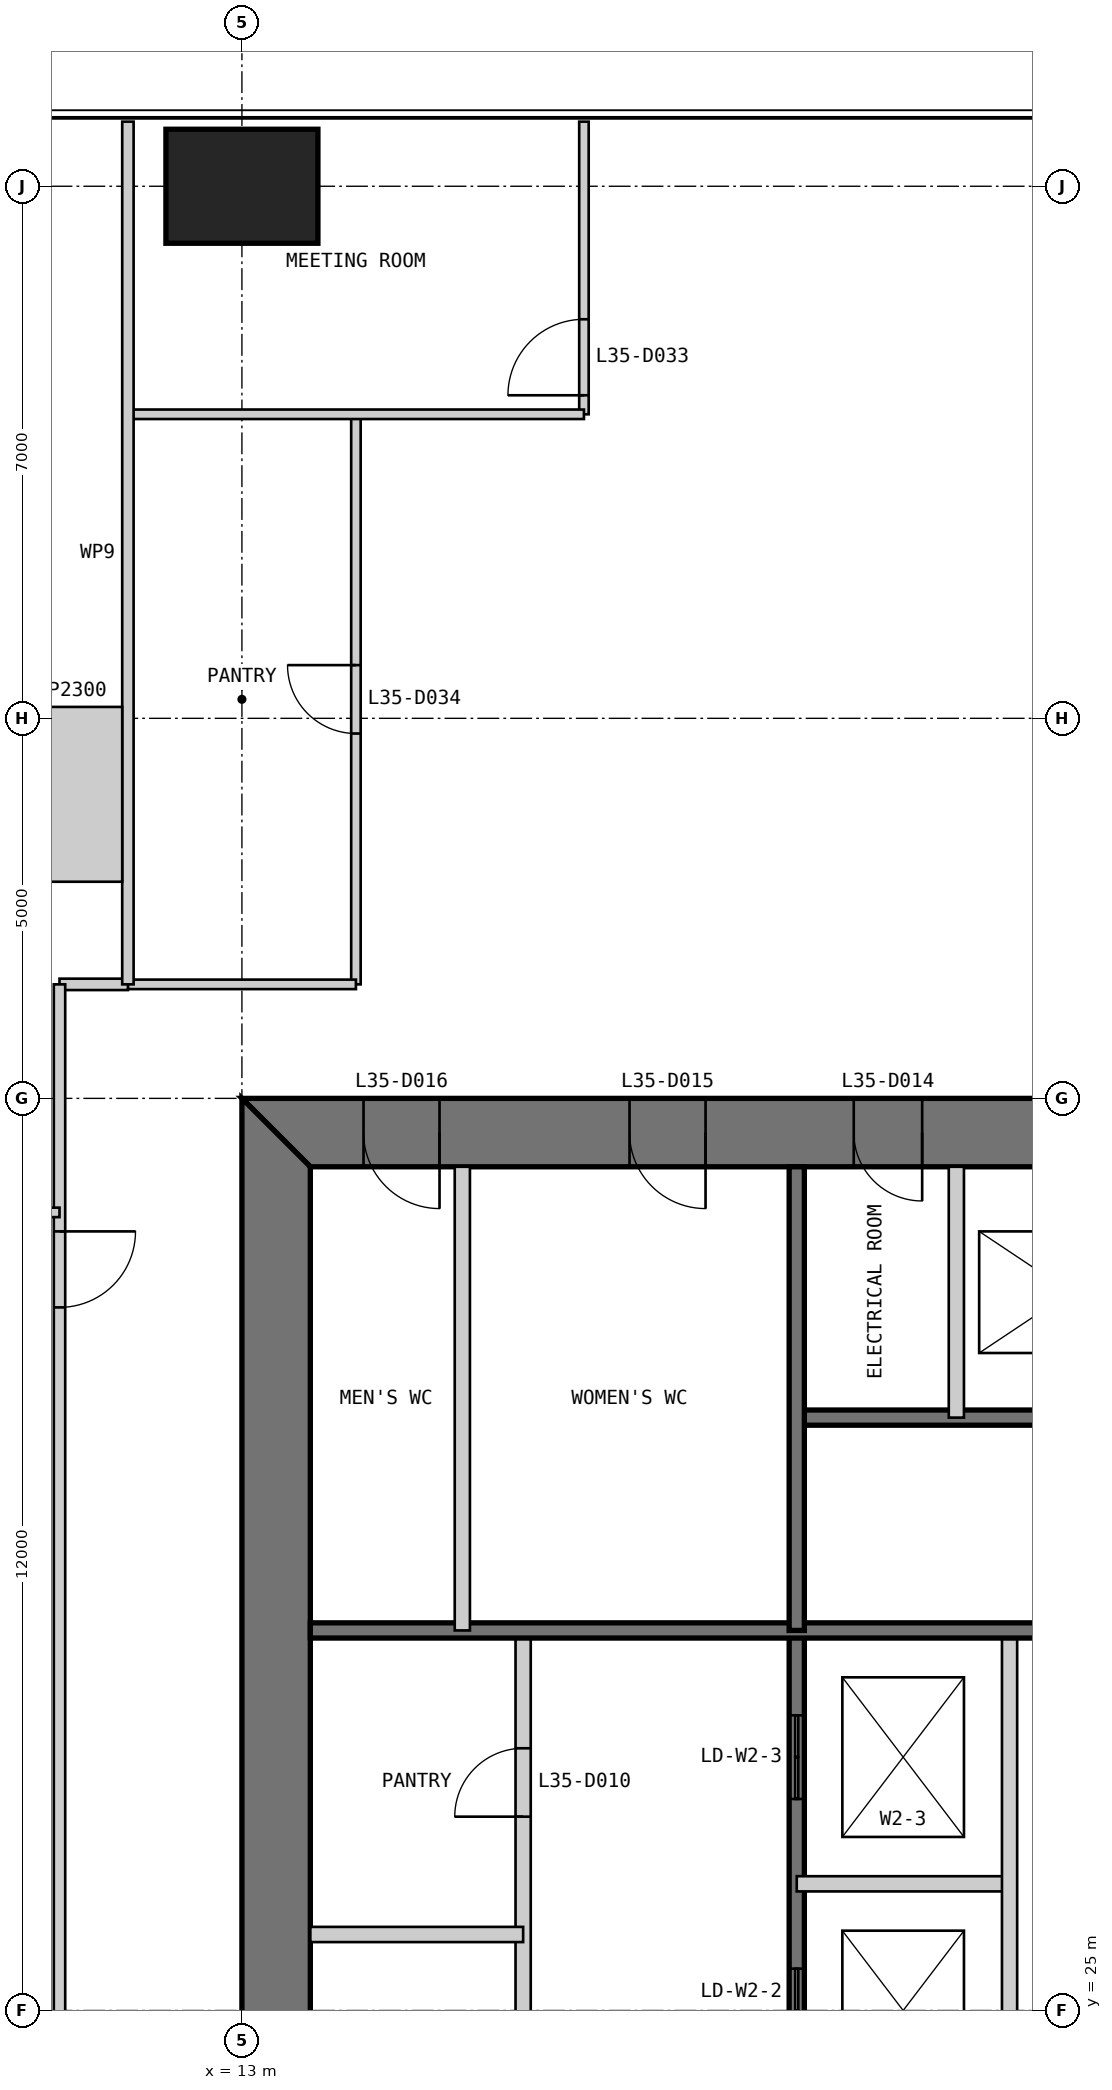
"""IFC4 building model, lengths in metres.
Left out: names, types, materials, properties, quantities, classifications, styles, units other than length and angle.
Written with IfcOpenShell. Run it as: python <this file> out.ifc"""

import sys

from ifc_helpers import new_model, si_unit, direction, frame, frame_2d, origin, origin_2d, place, context, subcontext, project, spatial, polyline, rectangle, outline, extrude, element, fill, save


model = new_model("IFC4")
c1 = context("Model", 3, precision=1e-05, world=origin(), true_north=direction((0.0, 1.0)))
c2 = subcontext(c1, "Body", "Model", "MODEL_VIEW")
j1 = project(units=[si_unit("LENGTHUNIT", "METRE"), si_unit("PLANEANGLEUNIT", "RADIAN")], contexts=[c1])
p1 = place(None, origin())
s1 = spatial("IfcSite", under=j1, at=p1, CompositionType="ELEMENT")
p2 = place(p1, origin())
s2 = spatial("IfcBuilding", under=s1, at=p2, CompositionType="ELEMENT")
p3 = place(p2, frame((0.0, 0.0, 150.4)))
s3 = spatial("IfcBuildingStorey", under=s2, at=p3, CompositionType="ELEMENT", Elevation=150.4)
p4 = place(p3, frame((13.0, 49.0, 0.0), z_axis=(0.0, 0.0, 1.0), x_axis=(1.0, 0.0, 0.0)))
e1 = element("IfcColumn", 1, at=p4, inside=s3, PredefinedType="COLUMN", context=c2, shape_type="SweptSolid", body=[
    extrude(rectangle(XDim=2.0, YDim=1.5, at=origin_2d()), origin(), (0.0, 0.0, 1.0), 4.0),
])
p5 = place(p3, frame((37.0, 36.55, 0.0), z_axis=(0.0, 0.0, 1.0), x_axis=(-1.0, 0.0, 0.0)))
e2 = element("IfcWall", 2, at=p5, inside=s3, PredefinedType="SHEAR", context=c2, shape_type="SweptSolid", body=[
    extrude(outline(polyline([(0.0, -0.45), (24.0, -0.45), (23.1, 0.45), (0.9, 0.45), (0.0, -0.45)])), origin(), (0.0, 0.0, 1.0), 4.0),
])
p6 = place(p5, frame((4.9, 0.0, 0.0)))
e3 = element("IfcOpeningElement", 3, at=p6, cuts=e2, PredefinedType="OPENING", context=c2, shape_type="SweptSolid", body=[
    extrude(rectangle(XDim=1.0, YDim=2.2, at=frame_2d((0.5, 1.1))), frame((0.0, 0.46, 0.0), z_axis=(0.0, -1.0, 0.0), x_axis=(1.0, 0.0, 0.0)), (0.0, 0.0, 1.0), 0.92),
])
p7 = place(p5, frame((8.9, 0.0, 0.0)))
e4 = element("IfcOpeningElement", 4, at=p7, cuts=e2, PredefinedType="OPENING", context=c2, shape_type="SweptSolid", body=[
    extrude(rectangle(XDim=1.1, YDim=2.2, at=frame_2d((0.55, 1.1))), frame((0.0, 0.46, 0.0), z_axis=(0.0, -1.0, 0.0), x_axis=(1.0, 0.0, 0.0)), (0.0, 0.0, 1.0), 0.92),
])
p8 = place(p5, frame((15.05, 0.0, 0.0)))
e5 = element("IfcOpeningElement", 5, at=p8, cuts=e2, PredefinedType="OPENING", context=c2, shape_type="SweptSolid", body=[
    extrude(rectangle(XDim=0.9, YDim=2.2, at=frame_2d((0.45, 1.1))), frame((0.0, 0.46, 0.0), z_axis=(0.0, -1.0, 0.0), x_axis=(1.0, 0.0, 0.0)), (0.0, 0.0, 1.0), 0.92),
])
p9 = place(p5, frame((17.9, 0.0, 0.0)))
e6 = element("IfcOpeningElement", 6, at=p9, cuts=e2, PredefinedType="OPENING", context=c2, shape_type="SweptSolid", body=[
    extrude(rectangle(XDim=1.0, YDim=2.2, at=frame_2d((0.5, 1.1))), frame((0.0, 0.46, 0.0), z_axis=(0.0, -1.0, 0.0), x_axis=(1.0, 0.0, 0.0)), (0.0, 0.0, 1.0), 0.92),
])
p10 = place(p5, frame((21.4, 0.0, 0.0)))
e7 = element("IfcOpeningElement", 7, at=p10, cuts=e2, PredefinedType="OPENING", context=c2, shape_type="SweptSolid", body=[
    extrude(rectangle(XDim=1.0, YDim=2.2, at=frame_2d((0.5, 1.1))), frame((0.0, 0.46, 0.0), z_axis=(0.0, -1.0, 0.0), x_axis=(1.0, 0.0, 0.0)), (0.0, 0.0, 1.0), 0.92),
])
p11 = place(p3, frame((13.45, 36.1, 0.0), z_axis=(0.0, 0.0, 1.0), x_axis=(0.0, -1.0, 0.0)))
e8 = element("IfcWall", 8, at=p11, inside=s3, PredefinedType="SHEAR", context=c2, shape_type="SweptSolid", body=[
    extrude(outline(polyline([(-0.9, -0.45), (23.1, -0.45), (22.2, 0.45), (0.0, 0.45), (-0.9, -0.45)])), origin(), (0.0, 0.0, 1.0), 4.0),
])
p12 = place(p11, frame((20.2, 0.0, 0.0)))
e9 = element("IfcOpeningElement", 9, at=p12, cuts=e8, PredefinedType="OPENING", context=c2, shape_type="SweptSolid", body=[
    extrude(rectangle(XDim=1.0, YDim=2.2, at=frame_2d((0.5, 1.1))), frame((0.0, 0.46, 0.0), z_axis=(0.0, -1.0, 0.0), x_axis=(1.0, 0.0, 0.0)), (0.0, 0.0, 1.0), 0.92),
])
p13 = place(p11, frame((17.25, 0.0, 0.0)))
e10 = element("IfcOpeningElement", 10, at=p13, cuts=e8, PredefinedType="OPENING", context=c2, shape_type="SweptSolid", body=[
    extrude(rectangle(XDim=0.9, YDim=2.2, at=frame_2d((0.45, 1.1))), frame((0.0, 0.46, 0.0), z_axis=(0.0, -1.0, 0.0), x_axis=(1.0, 0.0, 0.0)), (0.0, 0.0, 1.0), 0.92),
])
p14 = place(p3, frame((16.7, 13.9, 0.0), z_axis=(0.0, 0.0, 1.0), x_axis=(0.0, 1.0, 0.0)))
e11 = element("IfcWall", 11, at=p14, inside=s3, PredefinedType="PARTITIONING", context=c2, shape_type="SweptSolid", body=[
    extrude(rectangle(XDim=16.1, YDim=0.2, at=frame_2d((8.05, 0.0))), origin(), (0.0, 0.0, 1.0), 3.8),
])
p15 = place(p14, frame((9.65, 0.0, 0.0)))
e12 = element("IfcOpeningElement", 12, at=p15, cuts=e11, PredefinedType="OPENING", context=c2, shape_type="SweptSolid", body=[
    extrude(rectangle(XDim=0.9, YDim=2.2, at=frame_2d((0.45, 1.1))), frame((0.0, 0.11, 0.0), z_axis=(0.0, -1.0, 0.0), x_axis=(1.0, 0.0, 0.0)), (0.0, 0.0, 1.0), 0.22),
])
p16 = place(p14, frame((13.65, 0.0, 0.0)))
e13 = element("IfcOpeningElement", 13, at=p16, cuts=e11, PredefinedType="OPENING", context=c2, shape_type="SweptSolid", body=[
    extrude(rectangle(XDim=0.9, YDim=2.2, at=frame_2d((0.45, 1.1))), frame((0.0, 0.11, 0.0), z_axis=(0.0, -1.0, 0.0), x_axis=(1.0, 0.0, 0.0)), (0.0, 0.0, 1.0), 0.22),
])
p17 = place(p3, frame((20.3, 13.9, 0.0), z_axis=(0.0, 0.0, 1.0), x_axis=(0.0, 1.0, 0.0)))
e14 = element("IfcWall", 14, at=p17, inside=s3, PredefinedType="SOLIDWALL", context=c2, shape_type="SweptSolid", body=[
    extrude(rectangle(XDim=16.1, YDim=0.2, at=frame_2d((8.05, 0.0))), origin(), (0.0, 0.0, 1.0), 3.8),
])
p18 = place(p17, frame((7.217, 0.0, 0.0)))
e15 = element("IfcOpeningElement", 15, at=p18, cuts=e14, PredefinedType="OPENING", context=c2, shape_type="SweptSolid", body=[
    extrude(rectangle(XDim=1.1, YDim=2.2, at=frame_2d((0.55, 1.1))), frame((0.0, 0.11, 0.0), z_axis=(0.0, -1.0, 0.0), x_axis=(1.0, 0.0, 0.0)), (0.0, 0.0, 1.0), 0.22),
])
p19 = place(p17, frame((10.55, 0.0, 0.0)))
e16 = element("IfcOpeningElement", 16, at=p19, cuts=e14, PredefinedType="OPENING", context=c2, shape_type="SweptSolid", body=[
    extrude(rectangle(XDim=1.1, YDim=2.2, at=frame_2d((0.55, 1.1))), frame((0.0, 0.11, 0.0), z_axis=(0.0, -1.0, 0.0), x_axis=(1.0, 0.0, 0.0)), (0.0, 0.0, 1.0), 0.22),
])
p20 = place(p17, frame((13.883, 0.0, 0.0)))
e17 = element("IfcOpeningElement", 17, at=p20, cuts=e14, PredefinedType="OPENING", context=c2, shape_type="SweptSolid", body=[
    extrude(rectangle(XDim=1.1, YDim=2.2, at=frame_2d((0.55, 1.1))), frame((0.0, 0.11, 0.0), z_axis=(0.0, -1.0, 0.0), x_axis=(1.0, 0.0, 0.0)), (0.0, 0.0, 1.0), 0.22),
])
p21 = place(p3, frame((20.3, 26.667, 0.0), z_axis=(0.0, 0.0, 1.0), x_axis=(1.0, 0.0, 0.0)))
e18 = element("IfcWall", 18, at=p21, inside=s3, PredefinedType="PARTITIONING", context=c2, shape_type="SweptSolid", body=[
    extrude(rectangle(XDim=2.8, YDim=0.2, at=frame_2d((1.4, 0.0))), origin(), (0.0, 0.0, 1.0), 3.8),
])
p22 = place(p3, frame((23.1, 20.0, 0.0), z_axis=(0.0, 0.0, 1.0), x_axis=(0.0, 1.0, 0.0)))
e19 = element("IfcWall", 19, at=p22, inside=s3, PredefinedType="PARTITIONING", context=c2, shape_type="SweptSolid", body=[
    extrude(rectangle(XDim=10.0, YDim=0.2, at=frame_2d((5.0, 0.0))), origin(), (0.0, 0.0, 1.0), 3.8),
])
p23 = place(p3, frame((13.9, 26.0, 0.0), z_axis=(0.0, 0.0, 1.0), x_axis=(1.0, 0.0, 0.0)))
e20 = element("IfcWall", 20, at=p23, inside=s3, PredefinedType="PARTITIONING", context=c2, shape_type="SweptSolid", body=[
    extrude(rectangle(XDim=2.8, YDim=0.2, at=frame_2d((1.4, 0.0))), origin(), (0.0, 0.0, 1.0), 3.8),
])
p24 = place(p3, frame((29.7, 32.8, 0.0), z_axis=(0.0, 0.0, 1.0), x_axis=(-1.0, 0.0, 0.0)))
e21 = element("IfcWall", 21, at=p24, inside=s3, PredefinedType="SOLIDWALL", context=c2, shape_type="SweptSolid", body=[
    extrude(rectangle(XDim=9.4, YDim=0.2, at=frame_2d((4.7, 0.0))), origin(), (0.0, 0.0, 1.0), 3.8),
])
p25 = place(p24, frame((0.25, 0.0, 0.0)))
e22 = element("IfcOpeningElement", 22, at=p25, cuts=e21, PredefinedType="OPENING", context=c2, shape_type="SweptSolid", body=[
    extrude(rectangle(XDim=1.0, YDim=2.2, at=frame_2d((0.5, 1.1))), frame((0.0, 0.11, 0.0), z_axis=(0.0, -1.0, 0.0), x_axis=(1.0, 0.0, 0.0)), (0.0, 0.0, 1.0), 0.22),
])
p26 = place(p3, frame((29.7, 30.0, 0.0), z_axis=(0.0, 0.0, 1.0), x_axis=(-1.0, 0.0, 0.0)))
e23 = element("IfcWall", 23, at=p26, inside=s3, PredefinedType="SOLIDWALL", context=c2, shape_type="SweptSolid", body=[
    extrude(rectangle(XDim=15.8, YDim=0.2, at=frame_2d((7.9, 0.0))), origin(), (0.0, 0.0, 1.0), 3.8),
])
p27 = place(p3, frame((22.4, 36.1, 0.0), z_axis=(0.0, 0.0, 1.0), x_axis=(0.0, -1.0, 0.0)))
e24 = element("IfcWall", 24, at=p27, inside=s3, PredefinedType="PARTITIONING", context=c2, shape_type="SweptSolid", body=[
    extrude(rectangle(XDim=3.3, YDim=0.2, at=frame_2d((1.65, 0.0))), origin(), (0.0, 0.0, 1.0), 3.8),
])
p28 = place(p3, frame((20.3, 36.1, 0.0), z_axis=(0.0, 0.0, 1.0), x_axis=(0.0, -1.0, 0.0)))
e25 = element("IfcWall", 25, at=p28, inside=s3, PredefinedType="SOLIDWALL", context=c2, shape_type="SweptSolid", body=[
    extrude(rectangle(XDim=6.1, YDim=0.2, at=frame_2d((3.05, 0.0))), origin(), (0.0, 0.0, 1.0), 3.8),
])
p29 = place(p3, frame((15.9, 36.1, 0.0), z_axis=(0.0, 0.0, 1.0), x_axis=(0.0, -1.0, 0.0)))
e26 = element("IfcWall", 26, at=p29, inside=s3, PredefinedType="PARTITIONING", context=c2, shape_type="SweptSolid", body=[
    extrude(rectangle(XDim=6.1, YDim=0.2, at=frame_2d((3.05, 0.0))), origin(), (0.0, 0.0, 1.0), 3.8),
])
p30 = place(p3, frame((17.5, 49.85, 0.0), z_axis=(0.0, 0.0, 1.0), x_axis=(0.0, -1.0, 0.0)))
e27 = element("IfcWall", 27, at=p30, inside=s3, PredefinedType="PARTITIONING", context=c2, shape_type="SweptSolid", body=[
    extrude(rectangle(XDim=3.85, YDim=0.125, at=frame_2d((1.925, 0.0))), origin(), (0.0, 0.0, 1.0), 3.85),
])
p31 = place(p30, frame((2.6, 0.0, 0.0)))
e28 = element("IfcOpeningElement", 28, at=p31, cuts=e27, PredefinedType="OPENING", context=c2, shape_type="SweptSolid", body=[
    extrude(rectangle(XDim=1.0, YDim=2.2, at=frame_2d((0.5, 1.1))), frame((0.0, 0.073, 0.0), z_axis=(0.0, -1.0, 0.0), x_axis=(1.0, 0.0, 0.0)), (0.0, 0.0, 1.0), 0.145),
])
p32 = place(p3, frame((14.5, 46.0, 0.0), z_axis=(0.0, 0.0, 1.0), x_axis=(0.0, -1.0, 0.0)))
e29 = element("IfcWall", 29, at=p32, inside=s3, PredefinedType="PARTITIONING", context=c2, shape_type="SweptSolid", body=[
    extrude(rectangle(XDim=7.5, YDim=0.125, at=frame_2d((3.75, 0.0))), origin(), (0.0, 0.0, 1.0), 3.85),
])
p33 = place(p32, frame((3.3, 0.0, 0.0)))
e30 = element("IfcOpeningElement", 30, at=p33, cuts=e29, PredefinedType="OPENING", context=c2, shape_type="SweptSolid", body=[
    extrude(rectangle(XDim=0.9, YDim=2.2, at=frame_2d((0.45, 1.1))), frame((0.0, 0.073, 0.0), z_axis=(0.0, -1.0, 0.0), x_axis=(1.0, 0.0, 0.0)), (0.0, 0.0, 1.0), 0.145),
])
p34 = place(p3, frame((17.5, 46.0, 0.0), z_axis=(0.0, 0.0, 1.0), x_axis=(-1.0, 0.0, 0.0)))
e31 = element("IfcWall", 31, at=p34, inside=s3, PredefinedType="PARTITIONING", context=c2, shape_type="SweptSolid", body=[
    extrude(rectangle(XDim=6.0, YDim=0.125, at=frame_2d((3.0, 0.0))), origin(), (0.0, 0.0, 1.0), 3.85),
])
p35 = place(p3, frame((14.5, 38.5, 0.0), z_axis=(0.0, 0.0, 1.0), x_axis=(-1.0, 0.0, 0.0)))
e32 = element("IfcWall", 32, at=p35, inside=s3, PredefinedType="PARTITIONING", context=c2, shape_type="SweptSolid", body=[
    extrude(rectangle(XDim=3.0, YDim=0.125, at=frame_2d((1.5, 0.0))), origin(), (0.0, 0.0, 1.0), 3.85),
])
p36 = place(p3, frame((11.5, 38.5, 0.0), z_axis=(0.0, 0.0, 1.0), x_axis=(-1.0, 0.0, 0.0)))
e33 = element("IfcWall", 33, at=p36, inside=s3, PredefinedType="PARTITIONING", context=c2, shape_type="SweptSolid", body=[
    extrude(rectangle(XDim=0.9, YDim=0.15, at=frame_2d((0.45, 0.0))), origin(), (0.0, 0.0, 1.0), 3.85),
])
p37 = place(p3, frame((10.6, 38.5, 0.0), z_axis=(0.0, 0.0, 1.0), x_axis=(0.0, -1.0, 0.0)))
e34 = element("IfcWall", 34, at=p37, inside=s3, PredefinedType="PARTITIONING", context=c2, shape_type="SweptSolid", body=[
    extrude(rectangle(XDim=27.9, YDim=0.15, at=frame_2d((13.95, 0.0))), origin(), (0.0, 0.0, 1.0), 3.85),
])
p38 = place(p37, frame((3.25, 0.0, 0.0)))
e35 = element("IfcOpeningElement", 35, at=p38, cuts=e34, PredefinedType="OPENING", context=c2, shape_type="SweptSolid", body=[
    extrude(rectangle(XDim=1.0, YDim=2.2, at=frame_2d((0.5, 1.1))), frame((0.0, 0.085, 0.0), z_axis=(0.0, -1.0, 0.0), x_axis=(1.0, 0.0, 0.0)), (0.0, 0.0, 1.0), 0.17),
])
p39 = place(p37, frame((25.75, 0.0, 0.0)))
e36 = element("IfcOpeningElement", 36, at=p39, cuts=e34, PredefinedType="OPENING", context=c2, shape_type="SweptSolid", body=[
    extrude(rectangle(XDim=1.0, YDim=2.2, at=frame_2d((0.5, 1.1))), frame((0.0, 0.085, 0.0), z_axis=(0.0, -1.0, 0.0), x_axis=(1.0, 0.0, 0.0)), (0.0, 0.0, 1.0), 0.17),
])
p40 = place(p3, frame((11.5, 49.85, 0.0), z_axis=(0.0, 0.0, 1.0), x_axis=(0.0, -1.0, 0.0)))
e37 = element("IfcWall", 37, at=p40, inside=s3, PredefinedType="PARTITIONING", context=c2, shape_type="SweptSolid", body=[
    extrude(rectangle(XDim=11.35, YDim=0.15, at=frame_2d((5.675, 0.0))), origin(), (0.0, 0.0, 1.0), 3.85),
])
p41 = place(p3, frame((0.15, 35.5, 0.0), z_axis=(0.0, 0.0, 1.0), x_axis=(1.0, 0.0, 0.0)))
e38 = element("IfcWall", 38, at=p41, inside=s3, PredefinedType="PARTITIONING", context=c2, shape_type="SweptSolid", body=[
    extrude(rectangle(XDim=10.45, YDim=0.125, at=frame_2d((5.225, 0.0))), origin(), (0.0, 0.0, 1.0), 3.85),
])
p42 = place(p41, frame((6.65, 0.0, 0.0)))
e39 = element("IfcOpeningElement", 39, at=p42, cuts=e38, PredefinedType="OPENING", context=c2, shape_type="SweptSolid", body=[
    extrude(rectangle(XDim=1.0, YDim=2.2, at=frame_2d((0.5, 1.1))), frame((0.0, 0.073, 0.0), z_axis=(0.0, -1.0, 0.0), x_axis=(1.0, 0.0, 0.0)), (0.0, 0.0, 1.0), 0.145),
])
p43 = place(p3, frame((11.425, 41.0, 0.0), z_axis=(0.0, 0.0, 1.0), x_axis=(-1.0, 0.0, 0.0)))
e40 = element("IfcWall", 40, at=p43, inside=s3, PredefinedType="PARTITIONING", context=c2, shape_type="SweptSolid", body=[
    extrude(rectangle(XDim=1.325, YDim=2.3, at=frame_2d((0.663, 0.0))), origin(), (0.0, 0.0, 1.0), 3.85),
])
p44 = place(p16, origin())
e41 = element("IfcDoor", 41, at=p44, inside=s3, OperationType="SINGLE_SWING_LEFT", PredefinedType="DOOR", context=c2, shape_type="SweptSolid", body=[
    extrude(rectangle(XDim=0.9, YDim=2.2, at=frame_2d((0.45, 1.1))), frame((0.0, 0.025, 0.0), z_axis=(0.0, -1.0, 0.0), x_axis=(1.0, 0.0, 0.0)), (0.0, 0.0, 1.0), 0.05),
])
fill(e13, e41)
p45 = place(p8, origin())
e42 = element("IfcDoor", 42, at=p45, inside=s3, OperationType="SINGLE_SWING_LEFT", PredefinedType="DOOR", context=c2, shape_type="SweptSolid", body=[
    extrude(rectangle(XDim=0.9, YDim=2.2, at=frame_2d((0.45, 1.1))), frame((0.0, 0.025, 0.0), z_axis=(0.0, -1.0, 0.0), x_axis=(1.0, 0.0, 0.0)), (0.0, 0.0, 1.0), 0.05),
    extrude(outline(polyline([(0.0, 0.0), (0.04, 0.0), (0.04, 2.16), (0.86, 2.16), (0.86, 0.0), (0.9, 0.0), (0.9, 2.2), (0.0, 2.2), (0.0, 0.0)])), frame((0.0, 0.3, 0.0), z_axis=(0.0, -1.0, 0.0), x_axis=(1.0, 0.0, 0.0)), (0.0, 0.0, 1.0), 0.6),
])
fill(e5, e42)
p46 = place(p9, origin())
e43 = element("IfcDoor", 43, at=p46, inside=s3, OperationType="SINGLE_SWING_LEFT", PredefinedType="DOOR", context=c2, shape_type="SweptSolid", body=[
    extrude(rectangle(XDim=1.0, YDim=2.2, at=frame_2d((0.5, 1.1))), frame((0.0, 0.025, 0.0), z_axis=(0.0, -1.0, 0.0), x_axis=(1.0, 0.0, 0.0)), (0.0, 0.0, 1.0), 0.05),
    extrude(outline(polyline([(0.0, 0.0), (0.04, 0.0), (0.04, 2.16), (0.96, 2.16), (0.96, 0.0), (1.0, 0.0), (1.0, 2.2), (0.0, 2.2), (0.0, 0.0)])), frame((0.0, 0.3, 0.0), z_axis=(0.0, -1.0, 0.0), x_axis=(1.0, 0.0, 0.0)), (0.0, 0.0, 1.0), 0.6),
])
fill(e6, e43)
p47 = place(p10, origin())
e44 = element("IfcDoor", 44, at=p47, inside=s3, OperationType="SINGLE_SWING_LEFT", PredefinedType="DOOR", context=c2, shape_type="SweptSolid", body=[
    extrude(rectangle(XDim=1.0, YDim=2.2, at=frame_2d((0.5, 1.1))), frame((0.0, 0.025, 0.0), z_axis=(0.0, -1.0, 0.0), x_axis=(1.0, 0.0, 0.0)), (0.0, 0.0, 1.0), 0.05),
    extrude(outline(polyline([(0.0, 0.0), (0.04, 0.0), (0.04, 2.16), (0.96, 2.16), (0.96, 0.0), (1.0, 0.0), (1.0, 2.2), (0.0, 2.2), (0.0, 0.0)])), frame((0.0, 0.3, 0.0), z_axis=(0.0, -1.0, 0.0), x_axis=(1.0, 0.0, 0.0)), (0.0, 0.0, 1.0), 0.6),
])
fill(e7, e44)
p48 = place(p31, frame((1.0, 0.0, 0.0), z_axis=(0.0, 0.0, 1.0), x_axis=(-1.0, 0.0, 0.0)))
e45 = element("IfcDoor", 45, at=p48, inside=s3, OperationType="SINGLE_SWING_LEFT", PredefinedType="DOOR", context=c2, shape_type="SweptSolid", body=[
    extrude(rectangle(XDim=1.0, YDim=2.2, at=frame_2d((0.5, 1.1))), frame((0.0, 0.025, 0.0), z_axis=(0.0, -1.0, 0.0), x_axis=(1.0, 0.0, 0.0)), (0.0, 0.0, 1.0), 0.05),
])
fill(e28, e45)
p49 = place(p33, frame((0.9, 0.0, 0.0), z_axis=(0.0, 0.0, 1.0), x_axis=(-1.0, 0.0, 0.0)))
e46 = element("IfcDoor", 46, at=p49, inside=s3, OperationType="SINGLE_SWING_RIGHT", PredefinedType="DOOR", context=c2, shape_type="SweptSolid", body=[
    extrude(rectangle(XDim=0.9, YDim=2.2, at=frame_2d((0.45, 1.1))), frame((0.0, 0.025, 0.0), z_axis=(0.0, -1.0, 0.0), x_axis=(1.0, 0.0, 0.0)), (0.0, 0.0, 1.0), 0.05),
])
fill(e30, e46)
p50 = place(p38, origin())
e47 = element("IfcDoor", 47, at=p50, inside=s3, OperationType="SINGLE_SWING_LEFT", PredefinedType="DOOR", context=c2, shape_type="SweptSolid", body=[
    extrude(rectangle(XDim=1.0, YDim=2.2, at=frame_2d((0.5, 1.1))), frame((0.0, 0.025, 0.0), z_axis=(0.0, -1.0, 0.0), x_axis=(1.0, 0.0, 0.0)), (0.0, 0.0, 1.0), 0.05),
])
fill(e35, e47)
p51 = place(p19, origin())
e48 = element("IfcDoor", 48, at=p51, inside=s3, OperationType="DOUBLE_DOOR_SLIDING", PredefinedType="DOOR", context=c2, shape_type="SweptSolid", body=[
    extrude(rectangle(XDim=1.1, YDim=2.2, at=frame_2d((0.55, 1.1))), frame((0.0, 0.025, 0.0), z_axis=(0.0, -1.0, 0.0), x_axis=(1.0, 0.0, 0.0)), (0.0, 0.0, 1.0), 0.05),
])
fill(e16, e48)
p52 = place(p20, origin())
e49 = element("IfcDoor", 49, at=p52, inside=s3, OperationType="DOUBLE_DOOR_SLIDING", PredefinedType="DOOR", context=c2, shape_type="SweptSolid", body=[
    extrude(rectangle(XDim=1.1, YDim=2.2, at=frame_2d((0.55, 1.1))), frame((0.0, 0.025, 0.0), z_axis=(0.0, -1.0, 0.0), x_axis=(1.0, 0.0, 0.0)), (0.0, 0.0, 1.0), 0.05),
])
fill(e17, e49)
save(model, sys.argv[1])
